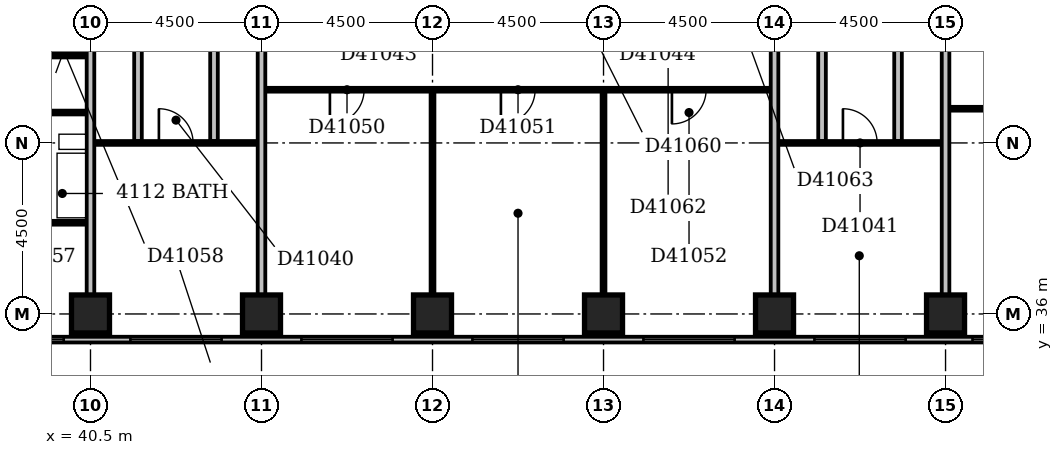
"""IFC4 building model, lengths in metres.
Left out: names, types, materials, properties, quantities, classifications, styles, units other than length and angle.
Written with IfcOpenShell. Run it as: python <this file> out.ifc"""

import sys

from ifc_helpers import new_model, si_unit, direction, frame, frame_2d, origin, origin_2d, place, context, subcontext, project, spatial, rectangle, extrude, element, fill, save


model = new_model("IFC4")
c1 = context("Model", 3, precision=1e-05, world=origin(), true_north=direction((0.0, 1.0)))
c2 = subcontext(c1, "Body", "Model", "MODEL_VIEW")
j1 = project(units=[si_unit("LENGTHUNIT", "METRE"), si_unit("PLANEANGLEUNIT", "RADIAN")], contexts=[c1])
p1 = place(None, origin())
s1 = spatial("IfcSite", under=j1, at=p1, CompositionType="ELEMENT")
p2 = place(p1, origin())
s2 = spatial("IfcBuilding", under=s1, at=p2, CompositionType="ELEMENT")
p3 = place(p2, frame((0.0, 0.0, 162.8)))
s3 = spatial("IfcBuildingStorey", under=s2, at=p3, CompositionType="ELEMENT", Elevation=162.8)
for number, where, z_axis, x_axis in (
    (1, (40.5, 36.0, -0.3), (0.0, 0.0, 1.0), (1.0, 0.0, 0.0)),
    (2, (45.0, 36.0, -0.3), (0.0, 0.0, 1.0), (1.0, 0.0, 0.0)),
    (3, (49.5, 36.0, -0.3), (0.0, 0.0, 1.0), (1.0, 0.0, 0.0)),
    (4, (54.0, 36.0, -0.3), (0.0, 0.0, 1.0), (1.0, 0.0, 0.0)),
    (5, (58.5, 36.0, -0.3), (0.0, 0.0, 1.0), (1.0, 0.0, 0.0)),
    (6, (63.0, 36.0, -0.3), (0.0, 0.0, 1.0), (1.0, 0.0, 0.0)),
):
    element("IfcColumn", number, at=place(p3, frame(where, z_axis=z_axis, x_axis=x_axis)), inside=s3, PredefinedType="COLUMN", context=c2, shape_type="SweptSolid", body=[
        extrude(rectangle(XDim=1.0, YDim=1.0, at=origin_2d()), origin(), (0.0, 0.0, 1.0), 3.6),
    ])
p4 = place(p3, frame((23.1, 35.325, 0.0), z_axis=(0.0, 0.0, 1.0), x_axis=(1.0, 0.0, 0.0)))
e7 = element("IfcWall", 7, at=p4, inside=s3, PredefinedType="STANDARD", context=c2, shape_type="SweptSolid", body=[
    extrude(rectangle(XDim=45.15, YDim=0.15, at=frame_2d((22.575, 0.0))), origin(), (0.0, 0.0, 1.0), 2.7),
])
p5 = place(p4, frame((0.45, 0.0, 0.6)))
e8 = element("IfcOpeningElement", 8, at=p5, cuts=e7, PredefinedType="OPENING", context=c2, shape_type="SweptSolid", body=[
    extrude(rectangle(XDim=2.4, YDim=1.8, at=frame_2d((1.2, 0.9))), frame((0.0, 0.087, 0.0), z_axis=(0.0, -1.0, 0.0), x_axis=(1.0, 0.0, 0.0)), (0.0, 0.0, 1.0), 0.174),
])
p6 = place(p4, frame((4.95, 0.0, 0.6)))
e9 = element("IfcOpeningElement", 9, at=p6, cuts=e7, PredefinedType="OPENING", context=c2, shape_type="SweptSolid", body=[
    extrude(rectangle(XDim=2.4, YDim=1.8, at=frame_2d((1.2, 0.9))), frame((0.0, 0.087, 0.0), z_axis=(0.0, -1.0, 0.0), x_axis=(1.0, 0.0, 0.0)), (0.0, 0.0, 1.0), 0.174),
])
p7 = place(p4, frame((9.167, 0.0, 0.6)))
e10 = element("IfcOpeningElement", 10, at=p7, cuts=e7, PredefinedType="OPENING", context=c2, shape_type="SweptSolid", body=[
    extrude(rectangle(XDim=1.8, YDim=1.8, at=frame_2d((0.9, 0.9))), frame((0.0, 0.087, 0.0), z_axis=(0.0, -1.0, 0.0), x_axis=(1.0, 0.0, 0.0)), (0.0, 0.0, 1.0), 0.174),
])
p8 = place(p4, frame((14.895, 0.0, 0.6)))
e11 = element("IfcOpeningElement", 11, at=p8, cuts=e7, PredefinedType="OPENING", context=c2, shape_type="SweptSolid", body=[
    extrude(rectangle(XDim=1.8, YDim=1.8, at=frame_2d((0.9, 0.9))), frame((0.0, 0.087, 0.0), z_axis=(0.0, -1.0, 0.0), x_axis=(1.0, 0.0, 0.0)), (0.0, 0.0, 1.0), 0.174),
])
p9 = place(p4, frame((18.45, 0.0, 0.6)))
e12 = element("IfcOpeningElement", 12, at=p9, cuts=e7, PredefinedType="OPENING", context=c2, shape_type="SweptSolid", body=[
    extrude(rectangle(XDim=2.4, YDim=1.8, at=frame_2d((1.2, 0.9))), frame((0.0, 0.087, 0.0), z_axis=(0.0, -1.0, 0.0), x_axis=(1.0, 0.0, 0.0)), (0.0, 0.0, 1.0), 0.174),
])
p10 = place(p4, frame((22.95, 0.0, 0.6)))
e13 = element("IfcOpeningElement", 13, at=p10, cuts=e7, PredefinedType="OPENING", context=c2, shape_type="SweptSolid", body=[
    extrude(rectangle(XDim=2.4, YDim=1.8, at=frame_2d((1.2, 0.9))), frame((0.0, 0.087, 0.0), z_axis=(0.0, -1.0, 0.0), x_axis=(1.0, 0.0, 0.0)), (0.0, 0.0, 1.0), 0.174),
])
p11 = place(p4, frame((27.45, 0.0, 0.6)))
e14 = element("IfcOpeningElement", 14, at=p11, cuts=e7, PredefinedType="OPENING", context=c2, shape_type="SweptSolid", body=[
    extrude(rectangle(XDim=2.4, YDim=1.8, at=frame_2d((1.2, 0.9))), frame((0.0, 0.087, 0.0), z_axis=(0.0, -1.0, 0.0), x_axis=(1.0, 0.0, 0.0)), (0.0, 0.0, 1.0), 0.174),
])
p12 = place(p4, frame((31.95, 0.0, 0.6)))
e15 = element("IfcOpeningElement", 15, at=p12, cuts=e7, PredefinedType="OPENING", context=c2, shape_type="SweptSolid", body=[
    extrude(rectangle(XDim=2.4, YDim=1.8, at=frame_2d((1.2, 0.9))), frame((0.0, 0.087, 0.0), z_axis=(0.0, -1.0, 0.0), x_axis=(1.0, 0.0, 0.0)), (0.0, 0.0, 1.0), 0.174),
])
p13 = place(p4, frame((36.45, 0.0, 0.6)))
e16 = element("IfcOpeningElement", 16, at=p13, cuts=e7, PredefinedType="OPENING", context=c2, shape_type="SweptSolid", body=[
    extrude(rectangle(XDim=2.4, YDim=1.8, at=frame_2d((1.2, 0.9))), frame((0.0, 0.087, 0.0), z_axis=(0.0, -1.0, 0.0), x_axis=(1.0, 0.0, 0.0)), (0.0, 0.0, 1.0), 0.174),
])
p14 = place(p4, frame((40.61, 0.0, 0.6)))
e17 = element("IfcOpeningElement", 17, at=p14, cuts=e7, PredefinedType="OPENING", context=c2, shape_type="SweptSolid", body=[
    extrude(rectangle(XDim=1.2, YDim=1.8, at=frame_2d((0.6, 0.9))), frame((0.0, 0.087, 0.0), z_axis=(0.0, -1.0, 0.0), x_axis=(1.0, 0.0, 0.0)), (0.0, 0.0, 1.0), 0.174),
])
p15 = place(p3, frame((40.5, 36.5, 0.0), z_axis=(0.0, 0.0, 1.0), x_axis=(0.0, 1.0, 0.0)))
e18 = element("IfcWall", 18, at=p15, inside=s3, PredefinedType="PARTITIONING", context=c2, shape_type="SweptSolid", body=[
    extrude(rectangle(XDim=12.9, YDim=0.2, at=frame_2d((6.45, 0.0))), origin(), (0.0, 0.0, 1.0), 3.3),
])
p16 = place(p3, frame((45.0, 36.5, 0.0), z_axis=(0.0, 0.0, 1.0), x_axis=(0.0, 1.0, 0.0)))
e19 = element("IfcWall", 19, at=p16, inside=s3, PredefinedType="PARTITIONING", context=c2, shape_type="SweptSolid", body=[
    extrude(rectangle(XDim=12.9, YDim=0.2, at=frame_2d((6.45, 0.0))), origin(), (0.0, 0.0, 1.0), 2.6),
])
p17 = place(p3, frame((49.5, 36.5, 0.0), z_axis=(0.0, 0.0, 1.0), x_axis=(0.0, 1.0, 0.0)))
e20 = element("IfcWall", 20, at=p17, inside=s3, PredefinedType="PARTITIONING", context=c2, shape_type="SweptSolid", body=[
    extrude(rectangle(XDim=5.35, YDim=0.1, at=frame_2d((2.675, 0.0))), origin(), (0.0, 0.0, 1.0), 3.3),
])
p18 = place(p3, frame((54.0, 36.5, 0.0), z_axis=(0.0, 0.0, 1.0), x_axis=(0.0, 1.0, 0.0)))
e21 = element("IfcWall", 21, at=p18, inside=s3, PredefinedType="PARTITIONING", context=c2, shape_type="SweptSolid", body=[
    extrude(rectangle(XDim=5.35, YDim=0.1, at=frame_2d((2.675, 0.0))), origin(), (0.0, 0.0, 1.0), 2.6),
])
p19 = place(p3, frame((58.5, 36.5, 0.0), z_axis=(0.0, 0.0, 1.0), x_axis=(0.0, 1.0, 0.0)))
e22 = element("IfcWall", 22, at=p19, inside=s3, PredefinedType="PARTITIONING", context=c2, shape_type="SweptSolid", body=[
    extrude(rectangle(XDim=12.9, YDim=0.2, at=frame_2d((6.45, 0.0))), origin(), (0.0, 0.0, 1.0), 3.3),
])
p20 = place(p3, frame((63.0, 36.5, 0.0), z_axis=(0.0, 0.0, 1.0), x_axis=(0.0, 1.0, 0.0)))
e23 = element("IfcWall", 23, at=p20, inside=s3, PredefinedType="PARTITIONING", context=c2, shape_type="SweptSolid", body=[
    extrude(rectangle(XDim=12.9, YDim=0.2, at=frame_2d((6.45, 0.0))), origin(), (0.0, 0.0, 1.0), 2.4),
])
p21 = place(p3, frame((38.25, 38.4, 0.0), z_axis=(0.0, 0.0, 1.0), x_axis=(1.0, 0.0, 0.0)))
e24 = element("IfcWall", 24, at=p21, inside=s3, PredefinedType="PLUMBINGWALL", context=c2, shape_type="SweptSolid", body=[
    extrude(rectangle(XDim=2.15, YDim=0.1, at=frame_2d((1.075, 0.0))), origin(), (0.0, 0.0, 1.0), 3.3),
])
p22 = place(p3, frame((40.6, 40.5, 0.0), z_axis=(0.0, 0.0, 1.0), x_axis=(1.0, 0.0, 0.0)))
e25 = element("IfcWall", 25, at=p22, inside=s3, PredefinedType="PARTITIONING", context=c2, shape_type="SweptSolid", body=[
    extrude(rectangle(XDim=4.3, YDim=0.1, at=frame_2d((2.15, 0.0))), origin(), (0.0, 0.0, 1.0), 3.3),
])
p23 = place(p22, frame((1.7, 0.0, 0.0)))
e26 = element("IfcOpeningElement", 26, at=p23, cuts=e25, PredefinedType="OPENING", context=c2, shape_type="SweptSolid", body=[
    extrude(rectangle(XDim=0.9, YDim=2.1, at=frame_2d((0.45, 1.05))), frame((0.0, 0.062, 0.0), z_axis=(0.0, -1.0, 0.0), x_axis=(1.0, 0.0, 0.0)), (0.0, 0.0, 1.0), 0.124),
])
p24 = place(p3, frame((58.6, 40.5, 0.0), z_axis=(0.0, 0.0, 1.0), x_axis=(1.0, 0.0, 0.0)))
e27 = element("IfcWall", 27, at=p24, inside=s3, PredefinedType="PARTITIONING", context=c2, shape_type="SweptSolid", body=[
    extrude(rectangle(XDim=4.3, YDim=0.1, at=frame_2d((2.15, 0.0))), origin(), (0.0, 0.0, 1.0), 3.3),
])
p25 = place(p24, frame((1.7, 0.0, 0.0)))
e28 = element("IfcOpeningElement", 28, at=p25, cuts=e27, PredefinedType="OPENING", context=c2, shape_type="SweptSolid", body=[
    extrude(rectangle(XDim=0.9, YDim=2.1, at=frame_2d((0.45, 1.05))), frame((0.0, 0.062, 0.0), z_axis=(0.0, -1.0, 0.0), x_axis=(1.0, 0.0, 0.0)), (0.0, 0.0, 1.0), 0.124),
])
p26 = place(p3, frame((41.75, 40.55, 0.0), z_axis=(0.0, 0.0, 1.0), x_axis=(0.0, 1.0, 0.0)))
e29 = element("IfcWall", 29, at=p26, inside=s3, PredefinedType="PARTITIONING", context=c2, shape_type="SweptSolid", body=[
    extrude(rectangle(XDim=8.95, YDim=0.2, at=frame_2d((4.475, 0.0))), origin(), (0.0, 0.0, 1.0), 3.3),
])
p27 = place(p26, frame((5.55, 0.0, 0.0)))
e30 = element("IfcOpeningElement", 30, at=p27, cuts=e29, PredefinedType="OPENING", context=c2, shape_type="SweptSolid", body=[
    extrude(rectangle(XDim=0.8, YDim=2.1, at=frame_2d((0.4, 1.05))), frame((0.0, 0.112, 0.0), z_axis=(0.0, -1.0, 0.0), x_axis=(1.0, 0.0, 0.0)), (0.0, 0.0, 1.0), 0.224),
])
p28 = place(p3, frame((43.75, 40.55, 0.0), z_axis=(0.0, 0.0, 1.0), x_axis=(0.0, 1.0, 0.0)))
e31 = element("IfcWall", 31, at=p28, inside=s3, PredefinedType="PARTITIONING", context=c2, shape_type="SweptSolid", body=[
    extrude(rectangle(XDim=8.95, YDim=0.2, at=frame_2d((4.475, 0.0))), origin(), (0.0, 0.0, 1.0), 3.3),
])
p29 = place(p28, frame((5.55, 0.0, 0.0)))
e32 = element("IfcOpeningElement", 32, at=p29, cuts=e31, PredefinedType="OPENING", context=c2, shape_type="SweptSolid", body=[
    extrude(rectangle(XDim=0.8, YDim=2.1, at=frame_2d((0.4, 1.05))), frame((0.0, 0.112, 0.0), z_axis=(0.0, -1.0, 0.0), x_axis=(1.0, 0.0, 0.0)), (0.0, 0.0, 1.0), 0.224),
])
p30 = place(p3, frame((59.75, 40.55, 0.0), z_axis=(0.0, 0.0, 1.0), x_axis=(0.0, 1.0, 0.0)))
e33 = element("IfcWall", 33, at=p30, inside=s3, PredefinedType="PARTITIONING", context=c2, shape_type="SweptSolid", body=[
    extrude(rectangle(XDim=8.95, YDim=0.2, at=frame_2d((4.475, 0.0))), origin(), (0.0, 0.0, 1.0), 3.3),
])
p31 = place(p30, frame((5.55, 0.0, 0.0)))
e34 = element("IfcOpeningElement", 34, at=p31, cuts=e33, PredefinedType="OPENING", context=c2, shape_type="SweptSolid", body=[
    extrude(rectangle(XDim=0.8, YDim=2.1, at=frame_2d((0.4, 1.05))), frame((0.0, 0.112, 0.0), z_axis=(0.0, -1.0, 0.0), x_axis=(1.0, 0.0, 0.0)), (0.0, 0.0, 1.0), 0.224),
])
p32 = place(p3, frame((61.75, 40.55, 0.0), z_axis=(0.0, 0.0, 1.0), x_axis=(0.0, 1.0, 0.0)))
e35 = element("IfcWall", 35, at=p32, inside=s3, PredefinedType="PARTITIONING", context=c2, shape_type="SweptSolid", body=[
    extrude(rectangle(XDim=8.95, YDim=0.2, at=frame_2d((4.475, 0.0))), origin(), (0.0, 0.0, 1.0), 3.3),
])
p33 = place(p32, frame((5.55, 0.0, 0.0)))
e36 = element("IfcOpeningElement", 36, at=p33, cuts=e35, PredefinedType="OPENING", context=c2, shape_type="SweptSolid", body=[
    extrude(rectangle(XDim=0.8, YDim=2.1, at=frame_2d((0.4, 1.05))), frame((0.0, 0.112, 0.0), z_axis=(0.0, -1.0, 0.0), x_axis=(1.0, 0.0, 0.0)), (0.0, 0.0, 1.0), 0.224),
])
p34 = place(p3, frame((22.6, 41.3, 0.0), z_axis=(0.0, 0.0, 1.0), x_axis=(1.0, 0.0, 0.0)))
e37 = element("IfcWall", 37, at=p34, inside=s3, PredefinedType="PARTITIONING", context=c2, shape_type="SweptSolid", body=[
    extrude(rectangle(XDim=17.8, YDim=0.1, at=frame_2d((8.9, 0.0))), origin(), (0.0, 0.0, 1.0), 3.3),
])
p35 = place(p34, frame((3.9, 0.0, 0.0)))
e38 = element("IfcOpeningElement", 38, at=p35, cuts=e37, PredefinedType="OPENING", context=c2, shape_type="SweptSolid", body=[
    extrude(rectangle(XDim=0.9, YDim=2.1, at=frame_2d((0.45, 1.05))), frame((0.0, 0.062, 0.0), z_axis=(0.0, -1.0, 0.0), x_axis=(1.0, 0.0, 0.0)), (0.0, 0.0, 1.0), 0.124),
])
p36 = place(p34, frame((10.7, 0.0, 0.0)))
e39 = element("IfcOpeningElement", 39, at=p36, cuts=e37, PredefinedType="OPENING", context=c2, shape_type="SweptSolid", body=[
    extrude(rectangle(XDim=0.9, YDim=2.1, at=frame_2d((0.45, 1.05))), frame((0.0, 0.062, 0.0), z_axis=(0.0, -1.0, 0.0), x_axis=(1.0, 0.0, 0.0)), (0.0, 0.0, 1.0), 0.124),
])
p37 = place(p34, frame((14.05, 0.0, 0.0)))
e40 = element("IfcOpeningElement", 40, at=p37, cuts=e37, PredefinedType="OPENING", context=c2, shape_type="SweptSolid", body=[
    extrude(rectangle(XDim=0.9, YDim=2.1, at=frame_2d((0.45, 1.05))), frame((0.0, 0.062, 0.0), z_axis=(0.0, -1.0, 0.0), x_axis=(1.0, 0.0, 0.0)), (0.0, 0.0, 1.0), 0.124),
])
p38 = place(p3, frame((63.1, 41.4, 0.0), z_axis=(0.0, 0.0, 1.0), x_axis=(1.0, 0.0, 0.0)))
e41 = element("IfcWall", 41, at=p38, inside=s3, PredefinedType="PARTITIONING", context=c2, shape_type="SweptSolid", body=[
    extrude(rectangle(XDim=5.0, YDim=0.1, at=frame_2d((2.5, 0.0))), origin(), (0.0, 0.0, 1.0), 3.3),
])
p39 = place(p38, frame((1.7, 0.0, 0.0)))
e42 = element("IfcOpeningElement", 42, at=p39, cuts=e41, PredefinedType="OPENING", context=c2, shape_type="SweptSolid", body=[
    extrude(rectangle(XDim=0.9, YDim=2.1, at=frame_2d((0.45, 1.05))), frame((0.0, 0.062, 0.0), z_axis=(0.0, -1.0, 0.0), x_axis=(1.0, 0.0, 0.0)), (0.0, 0.0, 1.0), 0.124),
])
p40 = place(p3, frame((45.1, 41.9, 0.0), z_axis=(0.0, 0.0, 1.0), x_axis=(1.0, 0.0, 0.0)))
e43 = element("IfcWall", 43, at=p40, inside=s3, PredefinedType="PARTITIONING", context=c2, shape_type="SweptSolid", body=[
    extrude(rectangle(XDim=13.3, YDim=0.1, at=frame_2d((6.65, 0.0))), origin(), (0.0, 0.0, 1.0), 3.3),
])
p41 = place(p40, frame((1.7, 0.0, 0.0)))
e44 = element("IfcOpeningElement", 44, at=p41, cuts=e43, PredefinedType="OPENING", context=c2, shape_type="SweptSolid", body=[
    extrude(rectangle(XDim=0.9, YDim=2.1, at=frame_2d((0.45, 1.05))), frame((0.0, 0.062, 0.0), z_axis=(0.0, -1.0, 0.0), x_axis=(1.0, 0.0, 0.0)), (0.0, 0.0, 1.0), 0.124),
])
p42 = place(p40, frame((6.2, 0.0, 0.0)))
e45 = element("IfcOpeningElement", 45, at=p42, cuts=e43, PredefinedType="OPENING", context=c2, shape_type="SweptSolid", body=[
    extrude(rectangle(XDim=0.9, YDim=2.1, at=frame_2d((0.45, 1.05))), frame((0.0, 0.062, 0.0), z_axis=(0.0, -1.0, 0.0), x_axis=(1.0, 0.0, 0.0)), (0.0, 0.0, 1.0), 0.124),
])
p43 = place(p40, frame((10.7, 0.0, 0.0)))
e46 = element("IfcOpeningElement", 46, at=p43, cuts=e43, PredefinedType="OPENING", context=c2, shape_type="SweptSolid", body=[
    extrude(rectangle(XDim=0.9, YDim=2.1, at=frame_2d((0.45, 1.05))), frame((0.0, 0.062, 0.0), z_axis=(0.0, -1.0, 0.0), x_axis=(1.0, 0.0, 0.0)), (0.0, 0.0, 1.0), 0.124),
])
p44 = place(p3, frame((29.25, 42.8, 0.0), z_axis=(0.0, 0.0, 1.0), x_axis=(1.0, 0.0, 0.0)))
e47 = element("IfcWall", 47, at=p44, inside=s3, PredefinedType="PARTITIONING", context=c2, shape_type="SweptSolid", body=[
    extrude(rectangle(XDim=11.15, YDim=0.1, at=frame_2d((5.575, 0.0))), origin(), (0.0, 0.0, 1.0), 3.3),
])
p45 = place(p44, frame((0.75, 0.0, 0.0)))
e48 = element("IfcOpeningElement", 48, at=p45, cuts=e47, PredefinedType="OPENING", context=c2, shape_type="SweptSolid", body=[
    extrude(rectangle(XDim=0.8, YDim=2.1, at=frame_2d((0.4, 1.05))), frame((0.0, 0.062, 0.0), z_axis=(0.0, -1.0, 0.0), x_axis=(1.0, 0.0, 0.0)), (0.0, 0.0, 1.0), 0.124),
])
p46 = place(p44, frame((8.05, 0.0, 0.0)))
e49 = element("IfcOpeningElement", 49, at=p46, cuts=e47, PredefinedType="OPENING", context=c2, shape_type="SweptSolid", body=[
    extrude(rectangle(XDim=0.8, YDim=2.1, at=frame_2d((0.4, 1.05))), frame((0.0, 0.062, 0.0), z_axis=(0.0, -1.0, 0.0), x_axis=(1.0, 0.0, 0.0)), (0.0, 0.0, 1.0), 0.124),
])
p47 = place(p44, frame((4.25, 0.0, 0.0)))
e50 = element("IfcOpeningElement", 50, at=p47, cuts=e47, PredefinedType="OPENING", context=c2, shape_type="SweptSolid", body=[
    extrude(rectangle(XDim=0.8, YDim=2.1, at=frame_2d((0.4, 1.05))), frame((0.0, 0.062, 0.0), z_axis=(0.0, -1.0, 0.0), x_axis=(1.0, 0.0, 0.0)), (0.0, 0.0, 1.0), 0.124),
])
p48 = place(p44, frame((6.05, 0.0, 0.0)))
e51 = element("IfcOpeningElement", 51, at=p48, cuts=e47, PredefinedType="OPENING", context=c2, shape_type="SweptSolid", body=[
    extrude(rectangle(XDim=0.8, YDim=2.1, at=frame_2d((0.4, 1.05))), frame((0.0, 0.062, 0.0), z_axis=(0.0, -1.0, 0.0), x_axis=(1.0, 0.0, 0.0)), (0.0, 0.0, 1.0), 0.124),
])
p49 = place(p44, frame((9.95, 0.0, 0.0)))
e52 = element("IfcOpeningElement", 52, at=p49, cuts=e47, PredefinedType="OPENING", context=c2, shape_type="SweptSolid", body=[
    extrude(rectangle(XDim=0.8, YDim=2.1, at=frame_2d((0.4, 1.05))), frame((0.0, 0.062, 0.0), z_axis=(0.0, -1.0, 0.0), x_axis=(1.0, 0.0, 0.0)), (0.0, 0.0, 1.0), 0.124),
])
p50 = place(p44, frame((2.7, 0.0, 0.0)))
e53 = element("IfcOpeningElement", 53, at=p50, cuts=e47, PredefinedType="OPENING", context=c2, shape_type="SweptSolid", body=[
    extrude(rectangle(XDim=0.8, YDim=2.1, at=frame_2d((0.4, 1.05))), frame((0.0, 0.062, 0.0), z_axis=(0.0, -1.0, 0.0), x_axis=(1.0, 0.0, 0.0)), (0.0, 0.0, 1.0), 0.124),
])
p51 = place(p8, origin())
e54 = element("IfcWindow", 54, at=p51, inside=s3, PartitioningType="SINGLE_PANEL", PredefinedType="WINDOW", context=c2, shape_type="SweptSolid", body=[
    extrude(rectangle(XDim=1.8, YDim=1.8, at=frame_2d((0.9, 0.9))), frame((0.0, 0.03, 0.0), z_axis=(0.0, -1.0, 0.0), x_axis=(1.0, 0.0, 0.0)), (0.0, 0.0, 1.0), 0.06),
])
fill(e11, e54)
p52 = place(p9, origin())
e55 = element("IfcWindow", 55, at=p52, inside=s3, PartitioningType="SINGLE_PANEL", PredefinedType="WINDOW", context=c2, shape_type="SweptSolid", body=[
    extrude(rectangle(XDim=2.4, YDim=1.8, at=frame_2d((1.2, 0.9))), frame((0.0, 0.03, 0.0), z_axis=(0.0, -1.0, 0.0), x_axis=(1.0, 0.0, 0.0)), (0.0, 0.0, 1.0), 0.06),
])
fill(e12, e55)
p53 = place(p10, origin())
e56 = element("IfcWindow", 56, at=p53, inside=s3, PartitioningType="SINGLE_PANEL", PredefinedType="WINDOW", context=c2, shape_type="SweptSolid", body=[
    extrude(rectangle(XDim=2.4, YDim=1.8, at=frame_2d((1.2, 0.9))), frame((0.0, 0.03, 0.0), z_axis=(0.0, -1.0, 0.0), x_axis=(1.0, 0.0, 0.0)), (0.0, 0.0, 1.0), 0.06),
])
fill(e13, e56)
p54 = place(p11, origin())
e57 = element("IfcWindow", 57, at=p54, inside=s3, PartitioningType="SINGLE_PANEL", PredefinedType="WINDOW", context=c2, shape_type="SweptSolid", body=[
    extrude(rectangle(XDim=2.4, YDim=1.8, at=frame_2d((1.2, 0.9))), frame((0.0, 0.03, 0.0), z_axis=(0.0, -1.0, 0.0), x_axis=(1.0, 0.0, 0.0)), (0.0, 0.0, 1.0), 0.06),
])
fill(e14, e57)
p55 = place(p12, origin())
e58 = element("IfcWindow", 58, at=p55, inside=s3, PartitioningType="SINGLE_PANEL", PredefinedType="WINDOW", context=c2, shape_type="SweptSolid", body=[
    extrude(rectangle(XDim=2.4, YDim=1.8, at=frame_2d((1.2, 0.9))), frame((0.0, 0.03, 0.0), z_axis=(0.0, -1.0, 0.0), x_axis=(1.0, 0.0, 0.0)), (0.0, 0.0, 1.0), 0.06),
])
fill(e15, e58)
p56 = place(p13, origin())
e59 = element("IfcWindow", 59, at=p56, inside=s3, PartitioningType="SINGLE_PANEL", PredefinedType="WINDOW", context=c2, shape_type="SweptSolid", body=[
    extrude(rectangle(XDim=2.4, YDim=1.8, at=frame_2d((1.2, 0.9))), frame((0.0, 0.03, 0.0), z_axis=(0.0, -1.0, 0.0), x_axis=(1.0, 0.0, 0.0)), (0.0, 0.0, 1.0), 0.06),
])
fill(e16, e59)
p57 = place(p14, origin())
e60 = element("IfcWindow", 60, at=p57, inside=s3, PartitioningType="SINGLE_PANEL", PredefinedType="WINDOW", context=c2, shape_type="SweptSolid", body=[
    extrude(rectangle(XDim=1.2, YDim=1.8, at=frame_2d((0.6, 0.9))), frame((0.0, 0.03, 0.0), z_axis=(0.0, -1.0, 0.0), x_axis=(1.0, 0.0, 0.0)), (0.0, 0.0, 1.0), 0.06),
])
fill(e17, e60)
p58 = place(p23, origin())
e61 = element("IfcDoor", 61, at=p58, inside=s3, OperationType="SINGLE_SWING_LEFT", PredefinedType="DOOR", context=c2, shape_type="SweptSolid", body=[
    extrude(rectangle(XDim=0.9, YDim=2.1, at=frame_2d((0.45, 1.05))), frame((0.0, 0.025, 0.0), z_axis=(0.0, -1.0, 0.0), x_axis=(1.0, 0.0, 0.0)), (0.0, 0.0, 1.0), 0.05),
])
fill(e26, e61)
p59 = place(p25, origin())
e62 = element("IfcDoor", 62, at=p59, inside=s3, OperationType="SINGLE_SWING_LEFT", PredefinedType="DOOR", context=c2, shape_type="SweptSolid", body=[
    extrude(rectangle(XDim=0.9, YDim=2.1, at=frame_2d((0.45, 1.05))), frame((0.0, 0.025, 0.0), z_axis=(0.0, -1.0, 0.0), x_axis=(1.0, 0.0, 0.0)), (0.0, 0.0, 1.0), 0.05),
])
fill(e28, e62)
p60 = place(p41, frame((0.9, 0.0, 0.0), z_axis=(0.0, 0.0, 1.0), x_axis=(-1.0, 0.0, 0.0)))
e63 = element("IfcDoor", 63, at=p60, inside=s3, OperationType="SINGLE_SWING_RIGHT", PredefinedType="DOOR", context=c2, shape_type="SweptSolid", body=[
    extrude(rectangle(XDim=0.9, YDim=2.1, at=frame_2d((0.45, 1.05))), frame((0.0, 0.025, 0.0), z_axis=(0.0, -1.0, 0.0), x_axis=(1.0, 0.0, 0.0)), (0.0, 0.0, 1.0), 0.05),
])
fill(e44, e63)
p61 = place(p42, frame((0.9, 0.0, 0.0), z_axis=(0.0, 0.0, 1.0), x_axis=(-1.0, 0.0, 0.0)))
e64 = element("IfcDoor", 64, at=p61, inside=s3, OperationType="SINGLE_SWING_RIGHT", PredefinedType="DOOR", context=c2, shape_type="SweptSolid", body=[
    extrude(rectangle(XDim=0.9, YDim=2.1, at=frame_2d((0.45, 1.05))), frame((0.0, 0.025, 0.0), z_axis=(0.0, -1.0, 0.0), x_axis=(1.0, 0.0, 0.0)), (0.0, 0.0, 1.0), 0.05),
])
fill(e45, e64)
p62 = place(p43, frame((0.9, 0.0, 0.0), z_axis=(0.0, 0.0, 1.0), x_axis=(-1.0, 0.0, 0.0)))
e65 = element("IfcDoor", 65, at=p62, inside=s3, OperationType="SINGLE_SWING_RIGHT", PredefinedType="DOOR", context=c2, shape_type="SweptSolid", body=[
    extrude(rectangle(XDim=0.9, YDim=2.1, at=frame_2d((0.45, 1.05))), frame((0.0, 0.025, 0.0), z_axis=(0.0, -1.0, 0.0), x_axis=(1.0, 0.0, 0.0)), (0.0, 0.0, 1.0), 0.05),
])
fill(e46, e65)
p63 = place(p49, origin())
e66 = element("IfcDoor", 66, at=p63, inside=s3, OperationType="SINGLE_SWING_LEFT", PredefinedType="DOOR", context=c2, shape_type="SweptSolid", body=[
    extrude(rectangle(XDim=0.8, YDim=2.1, at=frame_2d((0.4, 1.05))), frame((0.0, 0.025, 0.0), z_axis=(0.0, -1.0, 0.0), x_axis=(1.0, 0.0, 0.0)), (0.0, 0.0, 1.0), 0.05),
])
fill(e52, e66)
save(model, sys.argv[1])
